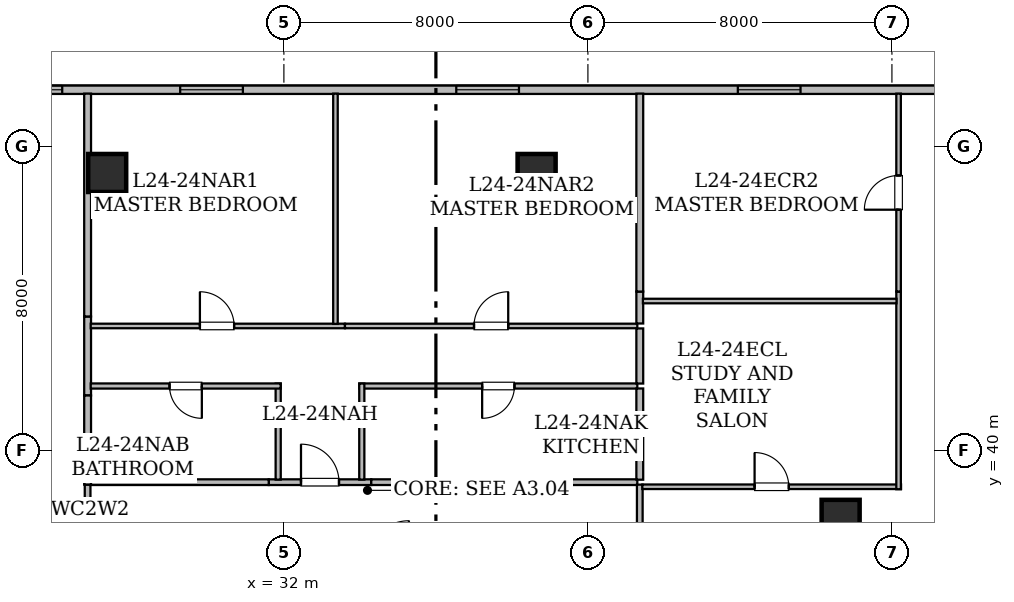
"""IFC4 building model, lengths in metres.
Left out: names, types, materials, properties, quantities, classifications, styles, units other than length and angle.
Written with IfcOpenShell. Run it as: python <this file> out.ifc"""

import sys

from ifc_helpers import new_model, si_unit, direction, frame, frame_2d, origin, origin_2d, place, context, subcontext, project, spatial, rectangle, hollow_rectangle, extrude, element, fill, save


model = new_model("IFC4")
c1 = context("Model", 3, precision=1e-05, world=origin(), true_north=direction((0.0, 1.0)))
c2 = subcontext(c1, "Body", "Model", "MODEL_VIEW")
j1 = project(units=[si_unit("LENGTHUNIT", "METRE"), si_unit("PLANEANGLEUNIT", "RADIAN")], contexts=[c1])
p1 = place(None, origin())
s1 = spatial("IfcSite", under=j1, at=p1, CompositionType="ELEMENT")
p2 = place(p1, origin())
s2 = spatial("IfcBuilding", under=s1, at=p2, CompositionType="ELEMENT")
p3 = place(p2, frame((0.0, 0.0, 98.25)))
s3 = spatial("IfcBuildingStorey", under=s2, at=p3, CompositionType="ELEMENT", Elevation=98.25)
for number, where, z_axis, x_axis in (
    (1, (27.35, 47.3, 0.0), (0.0, 0.0, 1.0), (1.0, 0.0, 0.0)),
    (2, (38.65, 47.3, 0.0), (0.0, 0.0, 1.0), (1.0, 0.0, 0.0)),
    (3, (46.65, 38.2, 0.0), (0.0, 0.0, 1.0), (1.0, 0.0, 0.0)),
):
    element("IfcColumn", number, at=place(p3, frame(where, z_axis=z_axis, x_axis=x_axis)), inside=s3, PredefinedType="COLUMN", context=c2, shape_type="SweptSolid", body=[
        extrude(hollow_rectangle(XDim=1.0, YDim=1.0, WallThickness=0.05, at=origin_2d()), origin(), (0.0, 0.0, 1.0), 3.65),
    ])
p4 = place(p3, frame((13.715, 49.49, 0.0), z_axis=(0.0, 0.0, 1.0), x_axis=(1.0, 0.0, 0.0)))
e4 = element("IfcWall", 4, at=p4, inside=s3, PredefinedType="STANDARD", context=c2, shape_type="SweptSolid", body=[
    extrude(rectangle(XDim=38.639, YDim=0.22, at=frame_2d((19.319, 0.0))), origin(), (0.0, 0.0, 1.0), 3.43),
])
p5 = place(p4, frame((1.435, 0.0, 0.85)))
e5 = element("IfcOpeningElement", 5, at=p5, cuts=e4, PredefinedType="OPENING", context=c2, shape_type="SweptSolid", body=[
    extrude(rectangle(XDim=1.65, YDim=1.55, at=frame_2d((0.825, 0.775))), frame((0.0, 0.12, 0.0), z_axis=(0.0, -1.0, 0.0), x_axis=(1.0, 0.0, 0.0)), (0.0, 0.0, 1.0), 0.24),
])
p6 = place(p4, frame((10.802, 0.0, 0.85)))
e6 = element("IfcOpeningElement", 6, at=p6, cuts=e4, PredefinedType="OPENING", context=c2, shape_type="SweptSolid", body=[
    extrude(rectangle(XDim=1.65, YDim=1.55, at=frame_2d((0.825, 0.775))), frame((0.0, 0.12, 0.0), z_axis=(0.0, -1.0, 0.0), x_axis=(1.0, 0.0, 0.0)), (0.0, 0.0, 1.0), 0.24),
])
p7 = place(p4, frame((8.744, 0.0, 0.8)))
e7 = element("IfcOpeningElement", 7, at=p7, cuts=e4, PredefinedType="OPENING", context=c2, shape_type="SweptSolid", body=[
    extrude(rectangle(XDim=1.2, YDim=1.5, at=frame_2d((0.6, 0.75))), frame((0.0, 0.12, 0.0), z_axis=(0.0, -1.0, 0.0), x_axis=(1.0, 0.0, 0.0)), (0.0, 0.0, 1.0), 0.24),
])
p8 = place(p4, frame((5.319, 0.0, 0.85)))
e8 = element("IfcOpeningElement", 8, at=p8, cuts=e4, PredefinedType="OPENING", context=c2, shape_type="SweptSolid", body=[
    extrude(rectangle(XDim=1.65, YDim=1.55, at=frame_2d((0.825, 0.775))), frame((0.0, 0.12, 0.0), z_axis=(0.0, -1.0, 0.0), x_axis=(1.0, 0.0, 0.0)), (0.0, 0.0, 1.0), 0.24),
])
p9 = place(p4, frame((15.556, 0.0, 0.85)))
e9 = element("IfcOpeningElement", 9, at=p9, cuts=e4, PredefinedType="OPENING", context=c2, shape_type="SweptSolid", body=[
    extrude(rectangle(XDim=1.65, YDim=1.55, at=frame_2d((0.825, 0.775))), frame((0.0, 0.12, 0.0), z_axis=(0.0, -1.0, 0.0), x_axis=(1.0, 0.0, 0.0)), (0.0, 0.0, 1.0), 0.24),
])
p10 = place(p4, frame((22.821, 0.0, 0.85)))
e10 = element("IfcOpeningElement", 10, at=p10, cuts=e4, PredefinedType="OPENING", context=c2, shape_type="SweptSolid", body=[
    extrude(rectangle(XDim=1.65, YDim=1.55, at=frame_2d((0.825, 0.775))), frame((0.0, 0.12, 0.0), z_axis=(0.0, -1.0, 0.0), x_axis=(1.0, 0.0, 0.0)), (0.0, 0.0, 1.0), 0.24),
])
p11 = place(p4, frame((30.23, 0.0, 0.85)))
e11 = element("IfcOpeningElement", 11, at=p11, cuts=e4, PredefinedType="OPENING", context=c2, shape_type="SweptSolid", body=[
    extrude(rectangle(XDim=1.65, YDim=1.55, at=frame_2d((0.825, 0.775))), frame((0.0, 0.12, 0.0), z_axis=(0.0, -1.0, 0.0), x_axis=(1.0, 0.0, 0.0)), (0.0, 0.0, 1.0), 0.24),
])
p12 = place(p4, frame((36.367, 0.0, 0.85)))
e12 = element("IfcOpeningElement", 12, at=p12, cuts=e4, PredefinedType="OPENING", context=c2, shape_type="SweptSolid", body=[
    extrude(rectangle(XDim=1.65, YDim=1.55, at=frame_2d((0.825, 0.775))), frame((0.0, 0.12, 0.0), z_axis=(0.0, -1.0, 0.0), x_axis=(1.0, 0.0, 0.0)), (0.0, 0.0, 1.0), 0.24),
])
p13 = place(p3, frame((26.835, 35.732, 0.0), z_axis=(0.0, 0.0, 1.0), x_axis=(0.0, 1.0, 0.0)))
e13 = element("IfcWall", 13, at=p13, inside=s3, PredefinedType="STANDARD", context=c2, shape_type="SweptSolid", body=[
    extrude(rectangle(XDim=3.368, YDim=0.15, at=frame_2d((1.684, 0.0))), origin(), (0.0, 0.0, 1.0), 2.647),
])
p14 = place(p3, frame((31.601, 39.165, 0.0), z_axis=(0.0, 0.0, 1.0), x_axis=(1.0, 0.0, 0.0)))
e14 = element("IfcWall", 14, at=p14, inside=s3, PredefinedType="STANDARD", context=c2, shape_type="SweptSolid", body=[
    extrude(rectangle(XDim=2.698, YDim=0.15, at=frame_2d((1.349, 0.0))), origin(), (0.0, 0.0, 1.0), 3.43),
])
p15 = place(p14, frame((0.849, 0.0, 0.0)))
e15 = element("IfcOpeningElement", 15, at=p15, cuts=e14, PredefinedType="OPENING", context=c2, shape_type="SweptSolid", body=[
    extrude(rectangle(XDim=1.0, YDim=2.15, at=frame_2d((0.5, 1.075))), frame((0.0, 0.085, 0.0), z_axis=(0.0, -1.0, 0.0), x_axis=(1.0, 0.0, 0.0)), (0.0, 0.0, 1.0), 0.17),
])
p16 = place(p3, frame((26.9, 39.165, 0.0), z_axis=(0.0, 0.0, 1.0), x_axis=(1.0, 0.0, 0.0)))
e16 = element("IfcWall", 16, at=p16, inside=s3, PredefinedType="STANDARD", context=c2, shape_type="SweptSolid", body=[
    extrude(rectangle(XDim=4.701, YDim=0.15, at=frame_2d((2.351, 0.0))), origin(), (0.0, 0.0, 1.0), 2.647),
])
p17 = place(p3, frame((34.299, 39.165, 0.0), z_axis=(0.0, 0.0, 1.0), x_axis=(1.0, 0.0, 0.0)))
e17 = element("IfcWall", 17, at=p17, inside=s3, PredefinedType="STANDARD", context=c2, shape_type="SweptSolid", body=[
    extrude(rectangle(XDim=7.001, YDim=0.15, at=frame_2d((3.5, 0.0))), origin(), (0.0, 0.0, 1.0), 2.647),
])
p18 = place(p3, frame((41.365, 39.1, 0.0), z_axis=(0.0, 0.0, 1.0), x_axis=(0.0, -1.0, 0.0)))
e18 = element("IfcWall", 18, at=p18, inside=s3, PredefinedType="STANDARD", context=c2, shape_type="SweptSolid", body=[
    extrude(rectangle(XDim=1.885, YDim=0.15, at=frame_2d((0.942, 0.0))), origin(), (0.0, 0.0, 1.0), 2.647),
])
p19 = place(p3, frame((26.835, 43.524, 0.0), z_axis=(0.0, 0.0, 1.0), x_axis=(0.0, -1.0, 0.0)))
e19 = element("IfcWall", 19, at=p19, inside=s3, PredefinedType="STANDARD", context=c2, shape_type="SweptSolid", body=[
    extrude(rectangle(XDim=2.078, YDim=0.18, at=frame_2d((1.039, 0.0))), origin(), (0.0, 0.0, 1.0), 3.43),
])
p20 = place(p3, frame((26.835, 41.446, 0.0), z_axis=(0.0, 0.0, 1.0), x_axis=(0.0, -1.0, 0.0)))
e20 = element("IfcWall", 20, at=p20, inside=s3, PredefinedType="STANDARD", context=c2, shape_type="SweptSolid", body=[
    extrude(rectangle(XDim=2.346, YDim=0.18, at=frame_2d((1.173, 0.0))), origin(), (0.0, 0.0, 1.0), 3.43),
])
p21 = place(p3, frame((26.835, 49.388, 0.0), z_axis=(0.0, 0.0, 1.0), x_axis=(0.0, -1.0, 0.0)))
e21 = element("IfcWall", 21, at=p21, inside=s3, PredefinedType="STANDARD", context=c2, shape_type="SweptSolid", body=[
    extrude(rectangle(XDim=5.864, YDim=0.18, at=frame_2d((2.932, 0.0))), origin(), (0.0, 0.0, 1.0), 2.876),
])
p22 = place(p3, frame((31.85, 39.232, 0.0), z_axis=(0.0, 0.0, 1.0), x_axis=(0.0, 1.0, 0.0)))
e22 = element("IfcWall", 22, at=p22, inside=s3, PredefinedType="PARTITIONING", context=c2, shape_type="SweptSolid", body=[
    extrude(rectangle(XDim=2.528, YDim=0.135, at=frame_2d((1.264, 0.0))), origin(), (0.0, 0.0, 1.0), 3.43),
])
p23 = place(p3, frame((31.915, 41.695, 0.0), z_axis=(0.0, 0.0, 1.0), x_axis=(-1.0, 0.0, 0.0)))
e23 = element("IfcWall", 23, at=p23, inside=s3, PredefinedType="PARTITIONING", context=c2, shape_type="SweptSolid", body=[
    extrude(rectangle(XDim=4.998, YDim=0.135, at=frame_2d((2.499, 0.0))), origin(), (0.0, 0.0, 1.0), 2.647),
])
p24 = place(p23, frame((2.074, 0.0, 0.0)))
e24 = element("IfcOpeningElement", 24, at=p24, cuts=e23, PredefinedType="OPENING", context=c2, shape_type="SweptSolid", body=[
    extrude(rectangle(XDim=0.85, YDim=2.1, at=frame_2d((0.425, 1.05))), frame((0.0, 0.077, 0.0), z_axis=(0.0, -1.0, 0.0), x_axis=(1.0, 0.0, 0.0)), (0.0, 0.0, 1.0), 0.155),
])
p25 = place(p3, frame((41.3, 41.695, 0.0), z_axis=(0.0, 0.0, 1.0), x_axis=(-1.0, 0.0, 0.0)))
e25 = element("IfcWall", 25, at=p25, inside=s3, PredefinedType="PARTITIONING", context=c2, shape_type="SweptSolid", body=[
    extrude(rectangle(XDim=7.315, YDim=0.135, at=frame_2d((3.657, 0.0))), origin(), (0.0, 0.0, 1.0), 2.647),
])
p26 = place(p25, frame((3.233, 0.0, 0.0)))
e26 = element("IfcOpeningElement", 26, at=p26, cuts=e25, PredefinedType="OPENING", context=c2, shape_type="SweptSolid", body=[
    extrude(rectangle(XDim=0.85, YDim=2.1, at=frame_2d((0.425, 1.05))), frame((0.0, 0.077, 0.0), z_axis=(0.0, -1.0, 0.0), x_axis=(1.0, 0.0, 0.0)), (0.0, 0.0, 1.0), 0.155),
])
p27 = place(p3, frame((34.05, 41.76, 0.0), z_axis=(0.0, 0.0, 1.0), x_axis=(0.0, -1.0, 0.0)))
e27 = element("IfcWall", 27, at=p27, inside=s3, PredefinedType="PARTITIONING", context=c2, shape_type="SweptSolid", body=[
    extrude(rectangle(XDim=2.528, YDim=0.135, at=frame_2d((1.264, 0.0))), origin(), (0.0, 0.0, 1.0), 3.43),
])
p28 = place(p3, frame((26.917, 43.275, 0.0), z_axis=(0.0, 0.0, 1.0), x_axis=(1.0, 0.0, 0.0)))
e28 = element("IfcWall", 28, at=p28, inside=s3, PredefinedType="PARTITIONING", context=c2, shape_type="SweptSolid", body=[
    extrude(rectangle(XDim=6.69, YDim=0.12, at=frame_2d((3.345, 0.0))), origin(), (0.0, 0.0, 1.0), 2.647),
])
p29 = place(p28, frame((2.873, 0.0, 0.0)))
e29 = element("IfcOpeningElement", 29, at=p29, cuts=e28, PredefinedType="OPENING", context=c2, shape_type="SweptSolid", body=[
    extrude(rectangle(XDim=0.9, YDim=2.1, at=frame_2d((0.45, 1.05))), frame((0.0, 0.07, 0.0), z_axis=(0.0, -1.0, 0.0), x_axis=(1.0, 0.0, 0.0)), (0.0, 0.0, 1.0), 0.14),
])
p30 = place(p3, frame((33.607, 43.275, 0.0), z_axis=(0.0, 0.0, 1.0), x_axis=(1.0, 0.0, 0.0)))
e30 = element("IfcWall", 30, at=p30, inside=s3, PredefinedType="PARTITIONING", context=c2, shape_type="SweptSolid", body=[
    extrude(rectangle(XDim=7.693, YDim=0.12, at=frame_2d((3.847, 0.0))), origin(), (0.0, 0.0, 1.0), 2.647),
])
p31 = place(p30, frame((3.396, 0.0, 0.0)))
e31 = element("IfcOpeningElement", 31, at=p31, cuts=e30, PredefinedType="OPENING", context=c2, shape_type="SweptSolid", body=[
    extrude(rectangle(XDim=0.9, YDim=2.1, at=frame_2d((0.45, 1.05))), frame((0.0, 0.07, 0.0), z_axis=(0.0, -1.0, 0.0), x_axis=(1.0, 0.0, 0.0)), (0.0, 0.0, 1.0), 0.14),
])
p32 = place(p3, frame((41.365, 43.21, 0.0), z_axis=(0.0, 0.0, 1.0), x_axis=(0.0, -1.0, 0.0)))
e32 = element("IfcWall", 32, at=p32, inside=s3, PredefinedType="STANDARD", context=c2, shape_type="SweptSolid", body=[
    extrude(rectangle(XDim=1.45, YDim=0.18, at=frame_2d((0.725, 0.0))), origin(), (0.0, 0.0, 1.0), 3.43),
])
p33 = place(p3, frame((41.365, 41.63, 0.0), z_axis=(0.0, 0.0, 1.0), x_axis=(0.0, -1.0, 0.0)))
e33 = element("IfcWall", 33, at=p33, inside=s3, PredefinedType="STANDARD", context=c2, shape_type="SweptSolid", body=[
    extrude(rectangle(XDim=2.4, YDim=0.18, at=frame_2d((1.2, 0.0))), origin(), (0.0, 0.0, 1.0), 3.43),
])
p34 = place(p3, frame((33.357, 49.388, 0.0), z_axis=(0.0, 0.0, 1.0), x_axis=(0.0, -1.0, 0.0)))
e34 = element("IfcWall", 34, at=p34, inside=s3, PredefinedType="PARTITIONING", context=c2, shape_type="SweptSolid", body=[
    extrude(rectangle(XDim=6.059, YDim=0.12, at=frame_2d((3.029, 0.0))), origin(), (0.0, 0.0, 1.0), 2.876),
])
p35 = place(p3, frame((41.365, 44.18, 0.0), z_axis=(0.0, 0.0, 1.0), x_axis=(0.0, -1.0, 0.0)))
e35 = element("IfcWall", 35, at=p35, inside=s3, PredefinedType="STANDARD", context=c2, shape_type="SweptSolid", body=[
    extrude(rectangle(XDim=0.84, YDim=0.18, at=frame_2d((0.42, 0.0))), origin(), (0.0, 0.0, 1.0), 3.43),
])
p36 = place(p3, frame((41.365, 49.388, 0.0), z_axis=(0.0, 0.0, 1.0), x_axis=(0.0, -1.0, 0.0)))
e36 = element("IfcWall", 36, at=p36, inside=s3, PredefinedType="STANDARD", context=c2, shape_type="SweptSolid", body=[
    extrude(rectangle(XDim=5.208, YDim=0.18, at=frame_2d((2.604, 0.0))), origin(), (0.0, 0.0, 1.0), 2.876),
])
p37 = place(p3, frame((41.432, 39.044, 0.0), z_axis=(0.0, 0.0, 1.0), x_axis=(1.0, 0.0, 0.0)))
e37 = element("IfcWall", 37, at=p37, inside=s3, PredefinedType="PARTITIONING", context=c2, shape_type="SweptSolid", body=[
    extrude(rectangle(XDim=6.808, YDim=0.12, at=frame_2d((3.404, 0.0))), origin(), (0.0, 0.0, 1.0), 2.647),
])
p38 = place(p37, frame((2.954, 0.0, 0.0)))
e38 = element("IfcOpeningElement", 38, at=p38, cuts=e37, PredefinedType="OPENING", context=c2, shape_type="SweptSolid", body=[
    extrude(rectangle(XDim=0.9, YDim=2.1, at=frame_2d((0.45, 1.05))), frame((0.0, 0.07, 0.0), z_axis=(0.0, -1.0, 0.0), x_axis=(1.0, 0.0, 0.0)), (0.0, 0.0, 1.0), 0.14),
])
p39 = place(p3, frame((48.175, 38.979, 0.0), z_axis=(0.0, 0.0, 1.0), x_axis=(0.0, 1.0, 0.0)))
e39 = element("IfcWall", 39, at=p39, inside=s3, PredefinedType="PARTITIONING", context=c2, shape_type="SweptSolid", body=[
    extrude(rectangle(XDim=5.201, YDim=0.12, at=frame_2d((2.601, 0.0))), origin(), (0.0, 0.0, 1.0), 2.647),
])
p40 = place(p3, frame((48.175, 44.18, 0.0), z_axis=(0.0, 0.0, 1.0), x_axis=(0.0, 1.0, 0.0)))
e40 = element("IfcWall", 40, at=p40, inside=s3, PredefinedType="PARTITIONING", context=c2, shape_type="SweptSolid", body=[
    extrude(rectangle(XDim=5.208, YDim=0.12, at=frame_2d((2.604, 0.0))), origin(), (0.0, 0.0, 1.0), 2.876),
])
p41 = place(p40, frame((2.154, 0.0, 0.0)))
e41 = element("IfcOpeningElement", 41, at=p41, cuts=e40, PredefinedType="OPENING", context=c2, shape_type="SweptSolid", body=[
    extrude(rectangle(XDim=0.9, YDim=2.1, at=frame_2d((0.45, 1.05))), frame((0.0, 0.07, 0.0), z_axis=(0.0, -1.0, 0.0), x_axis=(1.0, 0.0, 0.0)), (0.0, 0.0, 1.0), 0.14),
])
p42 = place(p3, frame((41.447, 43.931, 0.0), z_axis=(0.0, 0.0, 1.0), x_axis=(1.0, 0.0, 0.0)))
e42 = element("IfcWall", 42, at=p42, inside=s3, PredefinedType="PARTITIONING", context=c2, shape_type="SweptSolid", body=[
    extrude(rectangle(XDim=6.674, YDim=0.12, at=frame_2d((3.337, 0.0))), origin(), (0.0, 0.0, 1.0), 3.43),
])
p43 = place(p6, origin())
e43 = element("IfcWindow", 43, at=p43, inside=s3, PartitioningType="SINGLE_PANEL", PredefinedType="WINDOW", context=c2, shape_type="SweptSolid", body=[
    extrude(rectangle(XDim=1.65, YDim=1.55, at=frame_2d((0.825, 0.775))), frame((0.0, 0.03, 0.0), z_axis=(0.0, -1.0, 0.0), x_axis=(1.0, 0.0, 0.0)), (0.0, 0.0, 1.0), 0.06),
])
fill(e6, e43)
p44 = place(p9, origin())
e44 = element("IfcWindow", 44, at=p44, inside=s3, PartitioningType="SINGLE_PANEL", PredefinedType="WINDOW", context=c2, shape_type="SweptSolid", body=[
    extrude(rectangle(XDim=1.65, YDim=1.55, at=frame_2d((0.825, 0.775))), frame((0.0, 0.03, 0.0), z_axis=(0.0, -1.0, 0.0), x_axis=(1.0, 0.0, 0.0)), (0.0, 0.0, 1.0), 0.06),
])
fill(e9, e44)
p45 = place(p10, origin())
e45 = element("IfcWindow", 45, at=p45, inside=s3, PartitioningType="SINGLE_PANEL", PredefinedType="WINDOW", context=c2, shape_type="SweptSolid", body=[
    extrude(rectangle(XDim=1.65, YDim=1.55, at=frame_2d((0.825, 0.775))), frame((0.0, 0.03, 0.0), z_axis=(0.0, -1.0, 0.0), x_axis=(1.0, 0.0, 0.0)), (0.0, 0.0, 1.0), 0.06),
])
fill(e10, e45)
p46 = place(p11, origin())
e46 = element("IfcWindow", 46, at=p46, inside=s3, PartitioningType="SINGLE_PANEL", PredefinedType="WINDOW", context=c2, shape_type="SweptSolid", body=[
    extrude(rectangle(XDim=1.65, YDim=1.55, at=frame_2d((0.825, 0.775))), frame((0.0, 0.03, 0.0), z_axis=(0.0, -1.0, 0.0), x_axis=(1.0, 0.0, 0.0)), (0.0, 0.0, 1.0), 0.06),
])
fill(e11, e46)
p47 = place(p15, origin())
e47 = element("IfcDoor", 47, at=p47, inside=s3, OperationType="SINGLE_SWING_LEFT", PredefinedType="DOOR", context=c2, shape_type="SweptSolid", body=[
    extrude(rectangle(XDim=1.0, YDim=2.15, at=frame_2d((0.5, 1.075))), frame((0.0, 0.025, 0.0), z_axis=(0.0, -1.0, 0.0), x_axis=(1.0, 0.0, 0.0)), (0.0, 0.0, 1.0), 0.05),
])
fill(e15, e47)
p48 = place(p24, origin())
e48 = element("IfcDoor", 48, at=p48, inside=s3, OperationType="SINGLE_SWING_LEFT", PredefinedType="DOOR", context=c2, shape_type="SweptSolid", body=[
    extrude(rectangle(XDim=0.85, YDim=2.1, at=frame_2d((0.425, 1.05))), frame((0.0, 0.025, 0.0), z_axis=(0.0, -1.0, 0.0), x_axis=(1.0, 0.0, 0.0)), (0.0, 0.0, 1.0), 0.05),
])
fill(e24, e48)
p49 = place(p26, origin())
e49 = element("IfcDoor", 49, at=p49, inside=s3, OperationType="SINGLE_SWING_RIGHT", PredefinedType="DOOR", context=c2, shape_type="SweptSolid", body=[
    extrude(rectangle(XDim=0.85, YDim=2.1, at=frame_2d((0.425, 1.05))), frame((0.0, 0.025, 0.0), z_axis=(0.0, -1.0, 0.0), x_axis=(1.0, 0.0, 0.0)), (0.0, 0.0, 1.0), 0.05),
])
fill(e26, e49)
p50 = place(p29, origin())
e50 = element("IfcDoor", 50, at=p50, inside=s3, OperationType="SINGLE_SWING_LEFT", PredefinedType="DOOR", context=c2, shape_type="SweptSolid", body=[
    extrude(rectangle(XDim=0.9, YDim=2.1, at=frame_2d((0.45, 1.05))), frame((0.0, 0.025, 0.0), z_axis=(0.0, -1.0, 0.0), x_axis=(1.0, 0.0, 0.0)), (0.0, 0.0, 1.0), 0.05),
])
fill(e29, e50)
p51 = place(p31, origin())
e51 = element("IfcDoor", 51, at=p51, inside=s3, OperationType="SINGLE_SWING_RIGHT", PredefinedType="DOOR", context=c2, shape_type="SweptSolid", body=[
    extrude(rectangle(XDim=0.9, YDim=2.1, at=frame_2d((0.45, 1.05))), frame((0.0, 0.025, 0.0), z_axis=(0.0, -1.0, 0.0), x_axis=(1.0, 0.0, 0.0)), (0.0, 0.0, 1.0), 0.05),
])
fill(e31, e51)
p52 = place(p38, origin())
e52 = element("IfcDoor", 52, at=p52, inside=s3, OperationType="SINGLE_SWING_LEFT", PredefinedType="DOOR", context=c2, shape_type="SweptSolid", body=[
    extrude(rectangle(XDim=0.9, YDim=2.1, at=frame_2d((0.45, 1.05))), frame((0.0, 0.025, 0.0), z_axis=(0.0, -1.0, 0.0), x_axis=(1.0, 0.0, 0.0)), (0.0, 0.0, 1.0), 0.05),
])
fill(e38, e52)
p53 = place(p41, origin())
e53 = element("IfcDoor", 53, at=p53, inside=s3, OperationType="SINGLE_SWING_LEFT", PredefinedType="DOOR", context=c2, shape_type="SweptSolid", body=[
    extrude(rectangle(XDim=0.9, YDim=2.1, at=frame_2d((0.45, 1.05))), frame((0.0, 0.025, 0.0), z_axis=(0.0, -1.0, 0.0), x_axis=(1.0, 0.0, 0.0)), (0.0, 0.0, 1.0), 0.05),
])
fill(e41, e53)
save(model, sys.argv[1])
